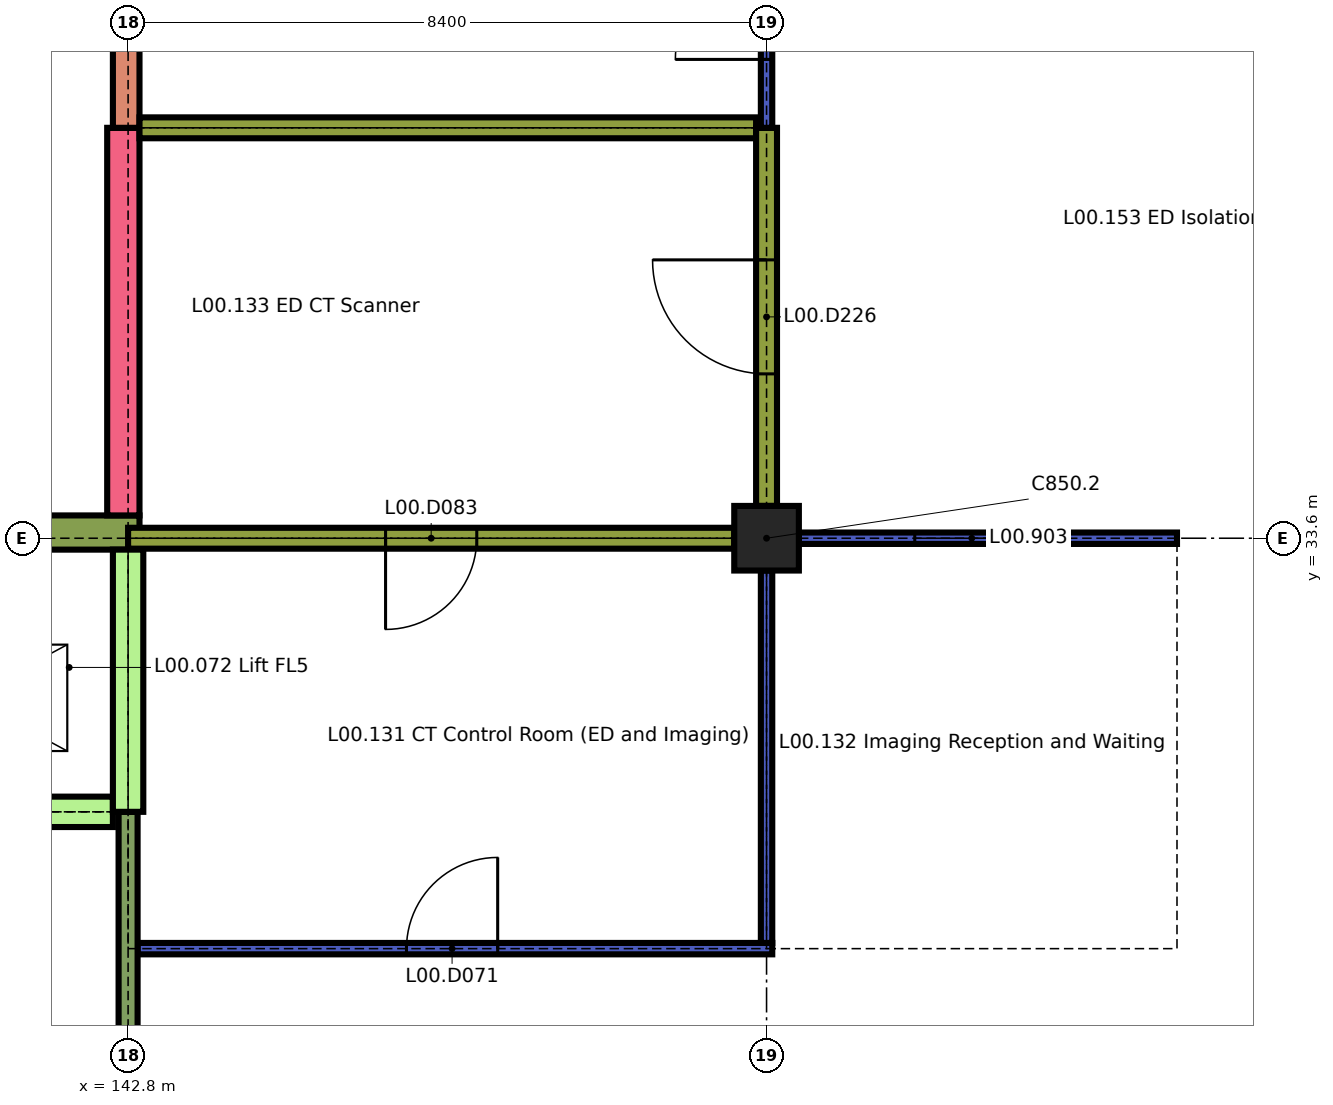
"""IFC4 building model, lengths in metres.
Left out: names, types, materials, properties, quantities, classifications, styles, units other than length and angle.
Written with IfcOpenShell. Run it as: python <this file> out.ifc"""

import sys

from ifc_helpers import new_model, si_unit, direction, frame, frame_2d, origin, origin_2d, place, context, subcontext, project, spatial, rectangle, extrude, element, fill, save


model = new_model("IFC4")
c1 = context("Model", 3, precision=1e-05, world=origin(), true_north=direction((0.0, 1.0)))
c2 = subcontext(c1, "Body", "Model", "MODEL_VIEW")
j1 = project(units=[si_unit("LENGTHUNIT", "METRE"), si_unit("PLANEANGLEUNIT", "RADIAN")], contexts=[c1])
p1 = place(None, origin())
s1 = spatial("IfcSite", under=j1, at=p1, CompositionType="ELEMENT")
p2 = place(p1, origin())
s2 = spatial("IfcBuilding", under=s1, at=p2, CompositionType="ELEMENT")
p3 = place(p2, origin())
s3 = spatial("IfcBuildingStorey", under=s2, at=p3, CompositionType="ELEMENT", Elevation=0.0)
p4 = place(p3, frame((151.2, 33.6, 0.0), z_axis=(0.0, 0.0, 1.0), x_axis=(1.0, 0.0, 0.0)))
e1 = element("IfcColumn", 1, at=p4, inside=s3, PredefinedType="COLUMN", context=c2, shape_type="SweptSolid", body=[
    extrude(rectangle(XDim=0.85, YDim=0.85, at=origin_2d()), origin(), (0.0, 0.0, 1.0), 4.14),
])
p5 = place(p3, frame((138.6, 33.675, 0.0), z_axis=(0.0, 0.0, 1.0), x_axis=(1.0, 0.0, 0.0)))
e2 = element("IfcWall", 2, at=p5, inside=s3, PredefinedType="SOLIDWALL", context=c2, shape_type="SweptSolid", body=[
    extrude(rectangle(XDim=4.35, YDim=0.45, at=frame_2d((2.175, 0.0))), origin(), (0.0, 0.0, 1.0), 4.14),
])
p6 = place(p3, frame((142.738, 33.9, 0.0), z_axis=(0.0, 0.0, 1.0), x_axis=(0.0, 1.0, 0.0)))
e3 = element("IfcWall", 3, at=p6, inside=s3, PredefinedType="SOLIDWALL", context=c2, shape_type="SweptSolid", body=[
    extrude(rectangle(XDim=5.1, YDim=0.425, at=frame_2d((2.55, 0.0))), origin(), (0.0, 0.0, 1.0), 4.14),
])
p7 = place(p3, frame((142.775, 39.0, 0.0), z_axis=(0.0, 0.0, 1.0), x_axis=(0.0, 1.0, 0.0)))
e4 = element("IfcWall", 4, at=p7, inside=s3, PredefinedType="SOLIDWALL", context=c2, shape_type="SweptSolid", body=[
    extrude(rectangle(XDim=3.0, YDim=0.35, at=frame_2d((1.5, 0.0))), origin(), (0.0, 0.0, 1.0), 4.14),
])
p8 = place(p3, frame((142.925, 28.2, 0.0), z_axis=(0.0, 0.0, 1.0), x_axis=(1.0, 0.0, 0.0)))
e5 = element("IfcWall", 5, at=p8, inside=s3, PredefinedType="PARTITIONING", context=c2, shape_type="SweptSolid", body=[
    extrude(rectangle(XDim=8.35, YDim=0.15, at=frame_2d((4.175, 0.0))), origin(), (0.0, 0.0, 1.0), 4.14),
])
p9 = place(p8, frame((3.538, 0.0, 0.0)))
e6 = element("IfcOpeningElement", 6, at=p9, cuts=e5, PredefinedType="OPENING", context=c2, shape_type="SweptSolid", body=[
    extrude(rectangle(XDim=1.2, YDim=2.1, at=frame_2d((0.6, 1.05))), frame((0.0, 0.085, 0.0), z_axis=(0.0, -1.0, 0.0), x_axis=(1.0, 0.0, 0.0)), (0.0, 0.0, 1.0), 0.17),
])
p10 = place(p3, frame((138.8, 30.0, 0.0), z_axis=(0.0, 0.0, 1.0), x_axis=(1.0, 0.0, 0.0)))
e7 = element("IfcWall", 7, at=p10, inside=s3, PredefinedType="SHEAR", context=c2, shape_type="SweptSolid", body=[
    extrude(rectangle(XDim=3.8, YDim=0.4, at=frame_2d((1.9, 0.0))), origin(), (0.0, 0.0, 1.0), 4.14),
])
p11 = place(p10, frame((1.25, 0.0, 0.0)))
e8 = element("IfcOpeningElement", 8, at=p11, cuts=e7, PredefinedType="OPENING", context=c2, shape_type="SweptSolid", body=[
    extrude(rectangle(XDim=1.3, YDim=2.1, at=frame_2d((0.65, 1.05))), frame((0.0, 0.21, 0.0), z_axis=(0.0, -1.0, 0.0), x_axis=(1.0, 0.0, 0.0)), (0.0, 0.0, 1.0), 0.42),
])
p12 = place(p3, frame((142.8, 33.6, 0.0), z_axis=(0.0, 0.0, 1.0), x_axis=(1.0, 0.0, 0.0)))
e9 = element("IfcWall", 9, at=p12, inside=s3, PredefinedType="SOLIDWALL", context=c2, shape_type="SweptSolid", body=[
    extrude(rectangle(XDim=7.975, YDim=0.275, at=frame_2d((3.987, 0.0))), origin(), (0.0, 0.0, 1.0), 4.14),
])
p13 = place(p12, frame((3.387, 0.0, 0.0)))
e10 = element("IfcOpeningElement", 10, at=p13, cuts=e9, PredefinedType="OPENING", context=c2, shape_type="SweptSolid", body=[
    extrude(rectangle(XDim=1.2, YDim=2.1, at=frame_2d((0.6, 1.05))), frame((0.0, 0.147, 0.0), z_axis=(0.0, -1.0, 0.0), x_axis=(1.0, 0.0, 0.0)), (0.0, 0.0, 1.0), 0.295),
])
p14 = place(p3, frame((151.625, 33.6, 0.0), z_axis=(0.0, 0.0, 1.0), x_axis=(1.0, 0.0, 0.0)))
e11 = element("IfcWall", 11, at=p14, inside=s3, PredefinedType="PARTITIONING", context=c2, shape_type="SweptSolid", body=[
    extrude(rectangle(XDim=4.975, YDim=0.15, at=frame_2d((2.488, 0.0))), origin(), (0.0, 0.0, 1.0), 4.14),
])
p15 = place(p14, frame((1.525, 0.0, 0.9)))
e12 = element("IfcOpeningElement", 12, at=p15, cuts=e11, PredefinedType="OPENING", context=c2, shape_type="SweptSolid", body=[
    extrude(rectangle(XDim=1.5, YDim=1.0, at=frame_2d((0.75, 0.5))), frame((0.0, 0.085, 0.0), z_axis=(0.0, -1.0, 0.0), x_axis=(1.0, 0.0, 0.0)), (0.0, 0.0, 1.0), 0.17),
])
p16 = place(p3, frame((142.95, 39.0, 0.0), z_axis=(0.0, 0.0, 1.0), x_axis=(1.0, 0.0, 0.0)))
e13 = element("IfcWall", 13, at=p16, inside=s3, PredefinedType="SOLIDWALL", context=c2, shape_type="SweptSolid", body=[
    extrude(rectangle(XDim=8.113, YDim=0.275, at=frame_2d((4.056, 0.0))), origin(), (0.0, 0.0, 1.0), 4.14),
])
p17 = place(p3, frame((142.8, 25.4, 0.0), z_axis=(0.0, 0.0, 1.0), x_axis=(0.0, 1.0, 0.0)))
e14 = element("IfcWall", 14, at=p17, inside=s3, PredefinedType="SOLIDWALL", context=c2, shape_type="SweptSolid", body=[
    extrude(rectangle(XDim=4.6, YDim=0.25, at=frame_2d((2.3, 0.0))), origin(), (0.0, 0.0, 1.0), 4.14),
])
p18 = place(p3, frame((142.8, 30.0, 0.0), z_axis=(0.0, 0.0, 1.0), x_axis=(0.0, 1.0, 0.0)))
e15 = element("IfcWall", 15, at=p18, inside=s3, PredefinedType="SHEAR", context=c2, shape_type="SweptSolid", body=[
    extrude(rectangle(XDim=3.45, YDim=0.4, at=frame_2d((1.725, 0.0))), origin(), (0.0, 0.0, 1.0), 4.14),
])
p19 = place(p3, frame((151.2, 28.275, 0.0), z_axis=(0.0, 0.0, 1.0), x_axis=(0.0, 1.0, 0.0)))
e16 = element("IfcWall", 16, at=p19, inside=s3, PredefinedType="PARTITIONING", context=c2, shape_type="SweptSolid", body=[
    extrude(rectangle(XDim=4.9, YDim=0.15, at=frame_2d((2.45, 0.0))), origin(), (0.0, 0.0, 1.0), 4.14),
])
p20 = place(p3, frame((151.2, 34.025, 0.0), z_axis=(0.0, 0.0, 1.0), x_axis=(0.0, 1.0, 0.0)))
e17 = element("IfcWall", 17, at=p20, inside=s3, PredefinedType="SOLIDWALL", context=c2, shape_type="SweptSolid", body=[
    extrude(rectangle(XDim=4.975, YDim=0.275, at=frame_2d((2.488, 0.0))), origin(), (0.0, 0.0, 1.0), 4.14),
])
p21 = place(p20, frame((1.738, 0.0, 0.0)))
e18 = element("IfcOpeningElement", 18, at=p21, cuts=e17, PredefinedType="OPENING", context=c2, shape_type="SweptSolid", body=[
    extrude(rectangle(XDim=1.5, YDim=2.4, at=frame_2d((0.75, 1.2))), frame((0.0, 0.147, 0.0), z_axis=(0.0, -1.0, 0.0), x_axis=(1.0, 0.0, 0.0)), (0.0, 0.0, 1.0), 0.295),
])
p22 = place(p3, frame((151.2, 39.0, 0.0), z_axis=(0.0, 0.0, 1.0), x_axis=(0.0, 1.0, 0.0)))
e19 = element("IfcWall", 19, at=p22, inside=s3, PredefinedType="PARTITIONING", context=c2, shape_type="SweptSolid", body=[
    extrude(rectangle(XDim=3.0, YDim=0.15, at=frame_2d((1.5, 0.0))), origin(), (0.0, 0.0, 1.0), 4.14),
])
p23 = place(p22, frame((0.9, 0.0, 0.0)))
e20 = element("IfcOpeningElement", 20, at=p23, cuts=e19, PredefinedType="OPENING", context=c2, shape_type="SweptSolid", body=[
    extrude(rectangle(XDim=1.2, YDim=2.1, at=frame_2d((0.6, 1.05))), frame((0.0, 0.085, 0.0), z_axis=(0.0, -1.0, 0.0), x_axis=(1.0, 0.0, 0.0)), (0.0, 0.0, 1.0), 0.17),
])
p24 = place(p9, origin())
e21 = element("IfcDoor", 21, at=p24, inside=s3, OperationType="SINGLE_SWING_LEFT", PredefinedType="DOOR", context=c2, shape_type="SweptSolid", body=[
    extrude(rectangle(XDim=1.2, YDim=2.1, at=frame_2d((0.6, 1.05))), frame((0.0, 0.025, 0.0), z_axis=(0.0, -1.0, 0.0), x_axis=(1.0, 0.0, 0.0)), (0.0, 0.0, 1.0), 0.05),
])
fill(e6, e21)
p25 = place(p13, origin())
e22 = element("IfcDoor", 22, at=p25, inside=s3, OperationType="SINGLE_SWING_LEFT", PredefinedType="DOOR", context=c2, shape_type="SweptSolid", body=[
    extrude(rectangle(XDim=1.2, YDim=2.1, at=frame_2d((0.6, 1.05))), frame((0.0, 0.04, 0.0), z_axis=(0.0, -1.0, 0.0), x_axis=(1.0, 0.0, 0.0)), (0.0, 0.0, 1.0), 0.08),
])
fill(e10, e22)
p26 = place(p21, origin())
e23 = element("IfcDoor", 23, at=p26, inside=s3, OperationType="SINGLE_SWING_LEFT", PredefinedType="DOOR", context=c2, shape_type="SweptSolid", body=[
    extrude(rectangle(XDim=1.5, YDim=2.4, at=frame_2d((0.75, 1.2))), frame((0.0, 0.045, 0.0), z_axis=(0.0, -1.0, 0.0), x_axis=(1.0, 0.0, 0.0)), (0.0, 0.0, 1.0), 0.09),
])
fill(e18, e23)
p27 = place(p23, origin())
e24 = element("IfcDoor", 24, at=p27, inside=s3, OperationType="SINGLE_SWING_RIGHT", PredefinedType="DOOR", context=c2, shape_type="SweptSolid", body=[
    extrude(rectangle(XDim=1.2, YDim=2.1, at=frame_2d((0.6, 1.05))), frame((0.0, 0.025, 0.0), z_axis=(0.0, -1.0, 0.0), x_axis=(1.0, 0.0, 0.0)), (0.0, 0.0, 1.0), 0.05),
])
fill(e20, e24)
p28 = place(p15, origin())
e25 = element("IfcWindow", 25, at=p28, inside=s3, PartitioningType="DOUBLE_PANEL_HORIZONTAL", PredefinedType="WINDOW", context=c2, shape_type="SweptSolid", body=[
    extrude(rectangle(XDim=1.5, YDim=1.0, at=frame_2d((0.75, 0.5))), frame((0.0, 0.025, 0.0), z_axis=(0.0, -1.0, 0.0), x_axis=(1.0, 0.0, 0.0)), (0.0, 0.0, 1.0), 0.05),
])
fill(e12, e25)
save(model, sys.argv[1])
